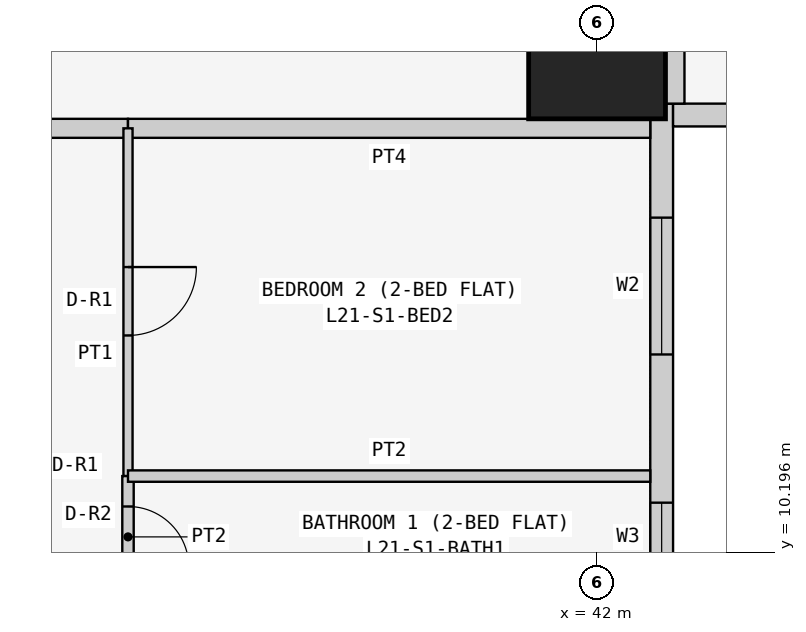
"""IFC4 building model, lengths in metres.
Left out: names, types, materials, properties, quantities, classifications, styles, units other than length and angle.
Written with IfcOpenShell. Run it as: python <this file> out.ifc"""

import sys

from ifc_helpers import new_model, si_unit, direction, frame, frame_2d, origin, origin_2d, place, context, subcontext, project, spatial, rectangle, extrude, element, fill, save


model = new_model("IFC4")
c1 = context("Model", 3, precision=1e-05, world=origin(), true_north=direction((0.0, 1.0)))
c2 = subcontext(c1, "Body", "Model", "MODEL_VIEW")
j1 = project(units=[si_unit("LENGTHUNIT", "METRE"), si_unit("PLANEANGLEUNIT", "RADIAN")], contexts=[c1])
p1 = place(None, origin())
s1 = spatial("IfcSite", under=j1, at=p1, CompositionType="ELEMENT")
p2 = place(p1, origin())
s2 = spatial("IfcBuilding", under=s1, at=p2, CompositionType="ELEMENT")
p3 = place(p2, frame((0.0, 0.0, 84.9)))
s3 = spatial("IfcBuildingStorey", under=s2, at=p3, CompositionType="ELEMENT", Elevation=84.9)
p4 = place(p3, frame((42.0, 16.8, 0.0), z_axis=(0.0, 0.0, 1.0), x_axis=(1.0, 0.0, 0.0)))
e1 = element("IfcColumn", 1, at=p4, inside=s3, PredefinedType="COLUMN", context=c2, shape_type="SweptSolid", body=[
    extrude(rectangle(XDim=1.8, YDim=1.8, at=origin_2d()), origin(), (0.0, 0.0, 1.0), 3.6),
])
p5 = place(p3, frame((42.85, 0.4, 0.0), z_axis=(0.0, 0.0, 1.0), x_axis=(0.0, 1.0, 0.0)))
e2 = element("IfcWall", 2, at=p5, inside=s3, PredefinedType="SOLIDWALL", context=c2, shape_type="SweptSolid", body=[
    extrude(rectangle(XDim=15.7, YDim=0.3, at=frame_2d((7.85, 0.0))), origin(), (0.0, 0.0, 1.0), 3.45),
])
p6 = place(p5, frame((12.4, 0.0, 0.9)))
e3 = element("IfcOpeningElement", 3, at=p6, cuts=e2, PredefinedType="OPENING", context=c2, shape_type="SweptSolid", body=[
    extrude(rectangle(XDim=1.8, YDim=1.5, at=frame_2d((0.9, 0.75))), frame((0.0, 0.16, 0.0), z_axis=(0.0, -1.0, 0.0), x_axis=(1.0, 0.0, 0.0)), (0.0, 0.0, 1.0), 0.32),
])
p7 = place(p5, frame((9.55, 0.0, 1.5)))
e4 = element("IfcOpeningElement", 4, at=p7, cuts=e2, PredefinedType="OPENING", context=c2, shape_type="SweptSolid", body=[
    extrude(rectangle(XDim=0.9, YDim=0.7, at=frame_2d((0.45, 0.35))), frame((0.0, 0.16, 0.0), z_axis=(0.0, -1.0, 0.0), x_axis=(1.0, 0.0, 0.0)), (0.0, 0.0, 1.0), 0.32),
])
p8 = place(p5, frame((5.1, 0.0, 0.9)))
e5 = element("IfcOpeningElement", 5, at=p8, cuts=e2, PredefinedType="OPENING", context=c2, shape_type="SweptSolid", body=[
    extrude(rectangle(XDim=1.8, YDim=1.5, at=frame_2d((0.9, 0.75))), frame((0.0, 0.16, 0.0), z_axis=(0.0, -1.0, 0.0), x_axis=(1.0, 0.0, 0.0)), (0.0, 0.0, 1.0), 0.32),
])
p9 = place(p5, frame((2.0, 0.0, 0.0)))
e6 = element("IfcOpeningElement", 6, at=p9, cuts=e2, PredefinedType="OPENING", context=c2, shape_type="SweptSolid", body=[
    extrude(rectangle(XDim=0.9, YDim=2.4, at=frame_2d((0.45, 1.2))), frame((0.0, 0.16, 0.0), z_axis=(0.0, -1.0, 0.0), x_axis=(1.0, 0.0, 0.0)), (0.0, 0.0, 1.0), 0.32),
])
p10 = place(p5, frame((0.7, 0.0, 0.9)))
e7 = element("IfcOpeningElement", 7, at=p10, cuts=e2, PredefinedType="OPENING", context=c2, shape_type="SweptSolid", body=[
    extrude(rectangle(XDim=1.2, YDim=1.5, at=frame_2d((0.6, 0.75))), frame((0.0, 0.16, 0.0), z_axis=(0.0, -1.0, 0.0), x_axis=(1.0, 0.0, 0.0)), (0.0, 0.0, 1.0), 0.32),
])
p11 = place(p3, frame((43.0, 15.95, 0.0), z_axis=(0.0, 0.0, 1.0), x_axis=(1.0, 0.0, 0.0)))
e8 = element("IfcWall", 8, at=p11, inside=s3, PredefinedType="SOLIDWALL", context=c2, shape_type="SweptSolid", body=[
    extrude(rectangle(XDim=15.4, YDim=0.3, at=frame_2d((7.7, 0.0))), origin(), (0.0, 0.0, 1.0), 3.45),
])
p12 = place(p11, frame((1.2, 0.0, 0.9)))
e9 = element("IfcOpeningElement", 9, at=p12, cuts=e8, PredefinedType="OPENING", context=c2, shape_type="SweptSolid", body=[
    extrude(rectangle(XDim=1.8, YDim=1.5, at=frame_2d((0.9, 0.75))), frame((0.0, 0.16, 0.0), z_axis=(0.0, -1.0, 0.0), x_axis=(1.0, 0.0, 0.0)), (0.0, 0.0, 1.0), 0.32),
])
p13 = place(p11, frame((4.95, 0.0, 1.5)))
e10 = element("IfcOpeningElement", 10, at=p13, cuts=e8, PredefinedType="OPENING", context=c2, shape_type="SweptSolid", body=[
    extrude(rectangle(XDim=0.9, YDim=0.7, at=frame_2d((0.45, 0.35))), frame((0.0, 0.16, 0.0), z_axis=(0.0, -1.0, 0.0), x_axis=(1.0, 0.0, 0.0)), (0.0, 0.0, 1.0), 0.32),
])
p14 = place(p11, frame((8.5, 0.0, 0.9)))
e11 = element("IfcOpeningElement", 11, at=p14, cuts=e8, PredefinedType="OPENING", context=c2, shape_type="SweptSolid", body=[
    extrude(rectangle(XDim=1.8, YDim=1.5, at=frame_2d((0.9, 0.75))), frame((0.0, 0.16, 0.0), z_axis=(0.0, -1.0, 0.0), x_axis=(1.0, 0.0, 0.0)), (0.0, 0.0, 1.0), 0.32),
])
p15 = place(p11, frame((12.5, 0.0, 0.0)))
e12 = element("IfcOpeningElement", 12, at=p15, cuts=e8, PredefinedType="OPENING", context=c2, shape_type="SweptSolid", body=[
    extrude(rectangle(XDim=0.9, YDim=2.4, at=frame_2d((0.45, 1.2))), frame((0.0, 0.16, 0.0), z_axis=(0.0, -1.0, 0.0), x_axis=(1.0, 0.0, 0.0)), (0.0, 0.0, 1.0), 0.32),
])
p16 = place(p11, frame((13.5, 0.0, 0.9)))
e13 = element("IfcOpeningElement", 13, at=p16, cuts=e8, PredefinedType="OPENING", context=c2, shape_type="SweptSolid", body=[
    extrude(rectangle(XDim=1.2, YDim=1.5, at=frame_2d((0.6, 0.75))), frame((0.0, 0.16, 0.0), z_axis=(0.0, -1.0, 0.0), x_axis=(1.0, 0.0, 0.0)), (0.0, 0.0, 1.0), 0.32),
])
p17 = place(p3, frame((43.025, 22.571, 0.0), z_axis=(0.0, 0.0, 1.0), x_axis=(0.0, -1.0, 0.0)))
e14 = element("IfcWall", 14, at=p17, inside=s3, PredefinedType="PARTITIONING", context=c2, shape_type="SweptSolid", body=[
    extrude(rectangle(XDim=6.471, YDim=0.25, at=frame_2d((3.235, 0.0))), origin(), (0.0, 0.0, 1.0), 3.45),
])
p18 = place(p3, frame((35.829, 15.775, 0.0), z_axis=(0.0, 0.0, 1.0), x_axis=(-1.0, 0.0, 0.0)))
e15 = element("IfcWall", 15, at=p18, inside=s3, PredefinedType="PARTITIONING", context=c2, shape_type="SweptSolid", body=[
    extrude(rectangle(XDim=1.2, YDim=0.25, at=frame_2d((0.6, 0.0))), origin(), (0.0, 0.0, 1.0), 3.45),
])
p19 = place(p3, frame((42.7, 15.775, 0.0), z_axis=(0.0, 0.0, 1.0), x_axis=(-1.0, 0.0, 0.0)))
e16 = element("IfcWall", 16, at=p19, inside=s3, PredefinedType="PARTITIONING", context=c2, shape_type="SweptSolid", body=[
    extrude(rectangle(XDim=6.871, YDim=0.25, at=frame_2d((3.436, 0.0))), origin(), (0.0, 0.0, 1.0), 3.45),
])
p20 = place(p3, frame((35.829, 11.2, 0.0), z_axis=(0.0, 0.0, 1.0), x_axis=(0.0, 1.0, 0.0)))
e17 = element("IfcWall", 17, at=p20, inside=s3, PredefinedType="PARTITIONING", context=c2, shape_type="SweptSolid", body=[
    extrude(rectangle(XDim=4.575, YDim=0.12, at=frame_2d((2.288, 0.0))), origin(), (0.0, 0.0, 1.0), 3.45),
])
p21 = place(p20, frame((1.85, 0.0, 0.0)))
e18 = element("IfcOpeningElement", 18, at=p21, cuts=e17, PredefinedType="OPENING", context=c2, shape_type="SweptSolid", body=[
    extrude(rectangle(XDim=0.9, YDim=2.1, at=frame_2d((0.45, 1.05))), frame((0.0, 0.07, 0.0), z_axis=(0.0, -1.0, 0.0), x_axis=(1.0, 0.0, 0.0)), (0.0, 0.0, 1.0), 0.14),
])
p22 = place(p3, frame((35.829, 9.6, 0.0), z_axis=(0.0, 0.0, 1.0), x_axis=(0.0, 1.0, 0.0)))
e19 = element("IfcWall", 19, at=p22, inside=s3, PredefinedType="PARTITIONING", context=c2, shape_type="SweptSolid", body=[
    extrude(rectangle(XDim=1.6, YDim=0.15, at=frame_2d((0.8, 0.0))), origin(), (0.0, 0.0, 1.0), 3.45),
])
p23 = place(p22, frame((0.4, 0.0, 0.0)))
e20 = element("IfcOpeningElement", 20, at=p23, cuts=e19, PredefinedType="OPENING", context=c2, shape_type="SweptSolid", body=[
    extrude(rectangle(XDim=0.8, YDim=2.1, at=frame_2d((0.4, 1.05))), frame((0.0, 0.085, 0.0), z_axis=(0.0, -1.0, 0.0), x_axis=(1.0, 0.0, 0.0)), (0.0, 0.0, 1.0), 0.17),
])
p24 = place(p3, frame((35.829, 11.2, 0.0), z_axis=(0.0, 0.0, 1.0), x_axis=(1.0, 0.0, 0.0)))
e21 = element("IfcWall", 21, at=p24, inside=s3, PredefinedType="PARTITIONING", context=c2, shape_type="SweptSolid", body=[
    extrude(rectangle(XDim=6.871, YDim=0.15, at=frame_2d((3.436, 0.0))), origin(), (0.0, 0.0, 1.0), 3.45),
])
p25 = place(p6, origin())
e22 = element("IfcWindow", 22, at=p25, inside=s3, PartitioningType="SINGLE_PANEL", PredefinedType="WINDOW", context=c2, shape_type="SweptSolid", body=[
    extrude(rectangle(XDim=1.8, YDim=1.5, at=frame_2d((0.9, 0.75))), frame((0.0, 0.03, 0.0), z_axis=(0.0, -1.0, 0.0), x_axis=(1.0, 0.0, 0.0)), (0.0, 0.0, 1.0), 0.06),
])
fill(e3, e22)
p26 = place(p7, origin())
e23 = element("IfcWindow", 23, at=p26, inside=s3, PartitioningType="SINGLE_PANEL", PredefinedType="WINDOW", context=c2, shape_type="SweptSolid", body=[
    extrude(rectangle(XDim=0.9, YDim=0.7, at=frame_2d((0.45, 0.35))), frame((0.0, 0.03, 0.0), z_axis=(0.0, -1.0, 0.0), x_axis=(1.0, 0.0, 0.0)), (0.0, 0.0, 1.0), 0.06),
])
fill(e4, e23)
p27 = place(p21, frame((0.9, 0.0, 0.0), z_axis=(0.0, 0.0, 1.0), x_axis=(-1.0, 0.0, 0.0)))
e24 = element("IfcDoor", 24, at=p27, inside=s3, OperationType="SINGLE_SWING_LEFT", PredefinedType="DOOR", context=c2, shape_type="SweptSolid", body=[
    extrude(rectangle(XDim=0.9, YDim=2.1, at=frame_2d((0.45, 1.05))), frame((0.0, 0.025, 0.0), z_axis=(0.0, -1.0, 0.0), x_axis=(1.0, 0.0, 0.0)), (0.0, 0.0, 1.0), 0.05),
])
fill(e18, e24)
p28 = place(p23, frame((0.8, 0.0, 0.0), z_axis=(0.0, 0.0, 1.0), x_axis=(-1.0, 0.0, 0.0)))
e25 = element("IfcDoor", 25, at=p28, inside=s3, OperationType="SINGLE_SWING_RIGHT", PredefinedType="DOOR", context=c2, shape_type="SweptSolid", body=[
    extrude(rectangle(XDim=0.8, YDim=2.1, at=frame_2d((0.4, 1.05))), frame((0.0, 0.025, 0.0), z_axis=(0.0, -1.0, 0.0), x_axis=(1.0, 0.0, 0.0)), (0.0, 0.0, 1.0), 0.05),
])
fill(e20, e25)
save(model, sys.argv[1])
